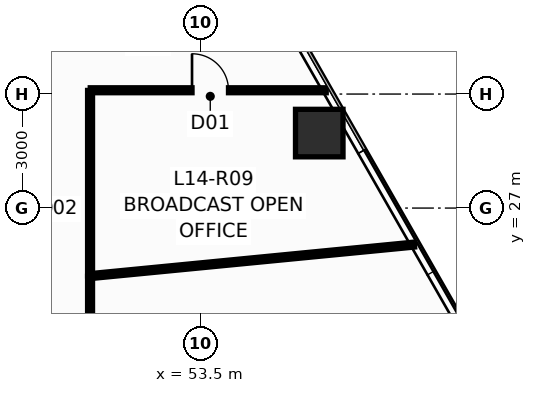
"""IFC4 building model, lengths in metres.
Left out: names, types, materials, properties, quantities, classifications, styles, units other than length and angle.
Written with IfcOpenShell. Run it as: python <this file> out.ifc"""

import sys

from ifc_helpers import new_model, si_unit, direction, frame, frame_2d, origin, origin_2d, place, context, subcontext, project, spatial, rectangle, hollow_rectangle, extrude, source, transform, mapped, element, fill, save


model = new_model("IFC4")
c1 = context("Model", 3, precision=1e-05, world=origin(), true_north=direction((0.0, 1.0)))
c2 = subcontext(c1, "Body", "Model", "MODEL_VIEW")
j1 = project(units=[si_unit("LENGTHUNIT", "METRE"), si_unit("PLANEANGLEUNIT", "RADIAN")], contexts=[c1])
p1 = place(None, origin())
s1 = spatial("IfcSite", under=j1, at=p1, CompositionType="ELEMENT")
p2 = place(p1, origin())
s2 = spatial("IfcBuilding", under=s1, at=p2, CompositionType="ELEMENT")
p3 = place(p2, frame((0.0, 0.0, 56.8)))
s3 = spatial("IfcBuildingStorey", under=s2, at=p3, CompositionType="ELEMENT", Elevation=56.8)
m1 = source(origin(), c2, "Body", "SweptSolid", [
    extrude(hollow_rectangle(XDim=1.25, YDim=1.25, WallThickness=0.07, at=origin_2d()), origin(), (0.0, 0.0, 1.0), 3.651),
])
p4 = place(p3, frame((56.631, 28.973, 0.0), z_axis=(-0.014913299626, -0.013843287097, 0.999792957015), x_axis=(0.680325028146, -0.732910537568, 0.0)))
e1 = element("IfcColumn", 1, at=p4, inside=s3, PredefinedType="COLUMN", context=c2, shape_type="MappedRepresentation", body=[
    mapped(m1, transform((0.0, 0.0, 0.0), scale=1.0)),
])
p5 = place(p3, frame((50.605, 25.21, 0.0), z_axis=(0.0, 0.0, 1.0), x_axis=(0.995299917846, 0.096840454021, 0.0)))
e2 = element("IfcWall", 2, at=p5, inside=s3, PredefinedType="PARTITIONING", context=c2, shape_type="SweptSolid", body=[
    extrude(rectangle(XDim=8.569, YDim=0.13, at=frame_2d((4.285, 0.0))), origin(), (0.0, 0.0, 1.0), 3.4),
])
p6 = place(p3, frame((50.6, 17.105, 0.0), z_axis=(0.0, 0.0, 1.0), x_axis=(0.0, 1.0, 0.0)))
e3 = element("IfcWall", 3, at=p6, inside=s3, PredefinedType="PARTITIONING", context=c2, shape_type="SweptSolid", body=[
    extrude(rectangle(XDim=8.1, YDim=0.13, at=frame_2d((4.05, 0.0))), origin(), (0.0, 0.0, 1.0), 3.026),
])
p7 = place(p3, frame((50.605, 30.1, 0.0), z_axis=(0.0, 0.0, 1.0), x_axis=(1.0, 0.0, 0.0)))
e4 = element("IfcWall", 4, at=p7, inside=s3, PredefinedType="PARTITIONING", context=c2, shape_type="SweptSolid", body=[
    extrude(rectangle(XDim=6.209, YDim=0.13, at=frame_2d((3.105, 0.0))), origin(), (0.0, 0.0, 1.0), 3.4),
])
p8 = place(p7, frame((2.678, 0.0, 0.0)))
e5 = element("IfcOpeningElement", 5, at=p8, cuts=e4, PredefinedType="OPENING", context=c2, shape_type="SweptSolid", body=[
    extrude(rectangle(XDim=0.96, YDim=2.15, at=frame_2d((0.48, 1.075))), frame((0.0, 0.077, 0.0), z_axis=(0.0, -1.0, 0.0), x_axis=(1.0, 0.0, 0.0)), (0.0, 0.0, 1.0), 0.154),
])
p9 = place(p3, frame((50.6, 25.215, 0.0), z_axis=(0.0, 0.0, 1.0), x_axis=(0.0, 1.0, 0.0)))
e6 = element("IfcWall", 6, at=p9, inside=s3, PredefinedType="PARTITIONING", context=c2, shape_type="SweptSolid", body=[
    extrude(rectangle(XDim=4.88, YDim=0.13, at=frame_2d((2.44, 0.0))), origin(), (0.0, 0.0, 1.0), 3.026),
])
p10 = place(p8, origin())
e7 = element("IfcDoor", 7, at=p10, inside=s3, OperationType="SINGLE_SWING_LEFT", PredefinedType="DOOR", context=c2, shape_type="SweptSolid", body=[
    extrude(rectangle(XDim=0.96, YDim=2.15, at=frame_2d((0.48, 1.075))), frame((0.0, 0.025, 0.0), z_axis=(0.0, -1.0, 0.0), x_axis=(1.0, 0.0, 0.0)), (0.0, 0.0, 1.0), 0.05),
])
fill(e5, e7)
save(model, sys.argv[1])
